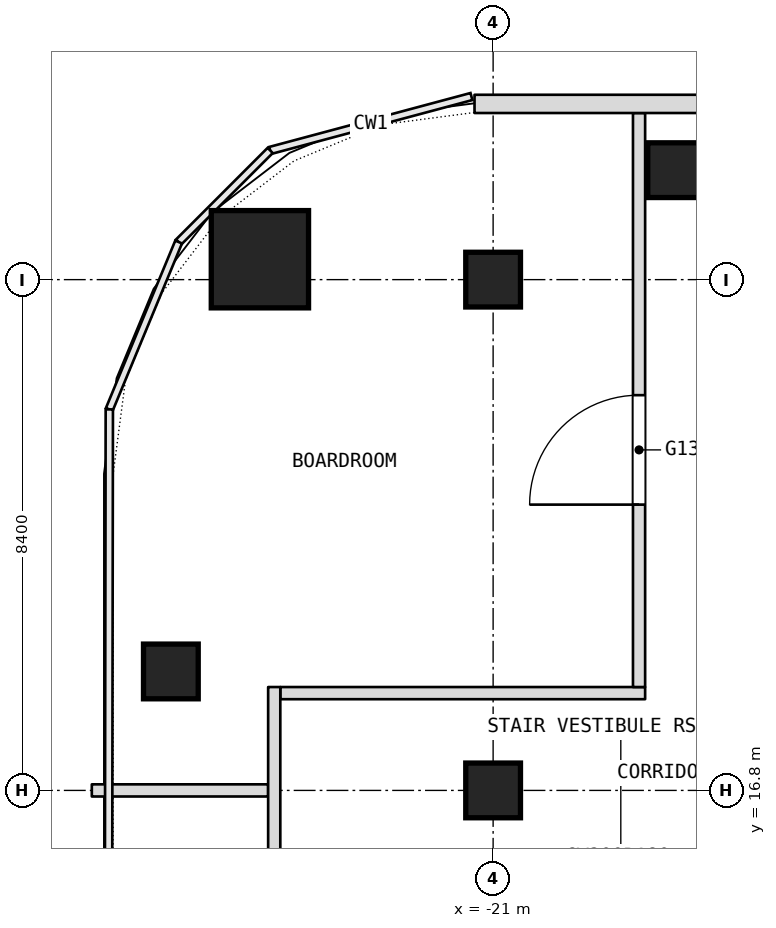
"""IFC4 building model, lengths in metres.
Left out: names, types, materials, properties, quantities, classifications, styles, units other than length and angle.
Written with IfcOpenShell. Run it as: python <this file> out.ifc"""

import sys

from ifc_helpers import new_model, si_unit, direction, frame, frame_2d, origin, origin_2d, place, context, subcontext, project, spatial, rectangle, extrude, element, fill, save


model = new_model("IFC4")
c1 = context("Model", 3, precision=1e-05, world=origin(), true_north=direction((0.0, 1.0)))
c2 = subcontext(c1, "Body", "Model", "MODEL_VIEW")
j1 = project(units=[si_unit("LENGTHUNIT", "METRE"), si_unit("PLANEANGLEUNIT", "RADIAN")], contexts=[c1])
p1 = place(None, origin())
s1 = spatial("IfcSite", under=j1, at=p1, CompositionType="ELEMENT")
p2 = place(p1, origin())
s2 = spatial("IfcBuilding", under=s1, at=p2, CompositionType="ELEMENT")
p3 = place(p2, frame((0.0, 0.0, 148.1)))
s3 = spatial("IfcBuildingStorey", under=s2, at=p3, CompositionType="ELEMENT", Elevation=148.1)
p4 = place(p3, frame((-24.835, 25.535, 0.0), z_axis=(0.0, 0.0, 1.0), x_axis=(1.0, 0.0, 0.0)))
e1 = element("IfcColumn", 1, at=p4, inside=s3, PredefinedType="COLUMN", context=c2, shape_type="SweptSolid", body=[
    extrude(rectangle(XDim=1.6, YDim=1.6, at=origin_2d()), origin(), (0.0, 0.0, 1.0), 3.6),
])
for number, where, z_axis, x_axis in (
    (2, (-21.0, 16.8, 0.0), (0.0, 0.0, 1.0), (1.0, 0.0, 0.0)),
    (3, (-21.0, 25.2, 0.0), (0.0, 0.0, 1.0), (1.0, 0.0, 0.0)),
    (4, (-26.3, 18.756, 0.0), (0.0, 0.0, 1.0), (1.0, 0.0, 0.0)),
    (5, (-18.007, 27.0, 0.0), (0.0, 0.0, 1.0), (1.0, 0.0, 0.0)),
):
    element("IfcColumn", number, at=place(p3, frame(where, z_axis=z_axis, x_axis=x_axis)), inside=s3, PredefinedType="COLUMN", context=c2, shape_type="SweptSolid", body=[
        extrude(rectangle(XDim=0.9, YDim=0.9, at=origin_2d()), origin(), (0.0, 0.0, 1.0), 3.6),
    ])
p5 = place(p3, frame((-27.6, 16.8, 0.0), z_axis=(0.0, 0.0, 1.0), x_axis=(1.0, 0.0, 0.0)))
e6 = element("IfcWall", 6, at=p5, inside=s3, PredefinedType="PARTITIONING", context=c2, shape_type="SweptSolid", body=[
    extrude(rectangle(XDim=2.9, YDim=0.2, at=frame_2d((1.45, 0.0))), origin(), (0.0, 0.0, 1.0), 2.89),
])
p6 = place(p3, frame((-24.5, 18.4, 0.0), z_axis=(0.0, 0.0, 1.0), x_axis=(1.0, 0.0, 0.0)))
e7 = element("IfcWall", 7, at=p6, inside=s3, PredefinedType="PARTITIONING", context=c2, shape_type="SweptSolid", body=[
    extrude(rectangle(XDim=6.0, YDim=0.2, at=frame_2d((3.0, 0.0))), origin(), (0.0, 0.0, 1.0), 3.34),
])
p7 = place(p3, frame((-18.6, 18.5, 0.0), z_axis=(0.0, 0.0, 1.0), x_axis=(0.0, 1.0, 0.0)))
e8 = element("IfcWall", 8, at=p7, inside=s3, PredefinedType="PARTITIONING", context=c2, shape_type="SweptSolid", body=[
    extrude(rectangle(XDim=9.44, YDim=0.2, at=frame_2d((4.72, 0.0))), origin(), (0.0, 0.0, 1.0), 3.34),
])
p8 = place(p7, frame((3.0, 0.0, 0.0)))
e9 = element("IfcOpeningElement", 9, at=p8, cuts=e8, PredefinedType="OPENING", context=c2, shape_type="SweptSolid", body=[
    extrude(rectangle(XDim=1.8, YDim=2.1, at=frame_2d((0.9, 1.05))), frame((0.0, 0.1, 0.0), z_axis=(0.0, -1.0, 0.0), x_axis=(1.0, 0.0, 0.0)), (0.0, 0.0, 1.0), 0.2),
])
p9 = place(p3, frame((-24.6, 6.9, 0.0), z_axis=(0.0, 0.0, 1.0), x_axis=(0.0, 1.0, 0.0)))
e10 = element("IfcWall", 10, at=p9, inside=s3, PredefinedType="PARTITIONING", context=c2, shape_type="SweptSolid", body=[
    extrude(rectangle(XDim=11.6, YDim=0.2, at=frame_2d((5.8, 0.0))), origin(), (0.0, 0.0, 1.0), 3.34),
])
p10 = place(p9, frame((5.45, 0.0, 0.0)))
e11 = element("IfcOpeningElement", 11, at=p10, cuts=e10, PredefinedType="OPENING", context=c2, shape_type="SweptSolid", body=[
    extrude(rectangle(XDim=1.8, YDim=2.1, at=frame_2d((0.9, 1.05))), frame((0.0, 0.1, 0.0), z_axis=(0.0, -1.0, 0.0), x_axis=(1.0, 0.0, 0.0)), (0.0, 0.0, 1.0), 0.2),
])
p11 = place(p3, frame((21.306, 28.09, 0.0), z_axis=(0.0, 0.0, 1.0), x_axis=(-1.0, 0.0, 0.0)))
e12 = element("IfcWall", 12, at=p11, inside=s3, PredefinedType="NOTDEFINED", context=c2, shape_type="SweptSolid", body=[
    extrude(rectangle(XDim=42.612, YDim=0.3, at=frame_2d((21.306, 0.0))), origin(), (0.0, 0.0, 1.0), 3.6),
])
p12 = place(p11, frame((5.406, 0.0, 0.9)))
e13 = element("IfcOpeningElement", 13, at=p12, cuts=e12, PredefinedType="OPENING", context=c2, shape_type="SweptSolid", body=[
    extrude(rectangle(XDim=2.4, YDim=2.1, at=frame_2d((1.2, 1.05))), frame((0.0, 0.15, 0.0), z_axis=(0.0, -1.0, 0.0), x_axis=(1.0, 0.0, 0.0)), (0.0, 0.0, 1.0), 0.3),
])
p13 = place(p11, frame((9.606, 0.0, 0.9)))
e14 = element("IfcOpeningElement", 14, at=p13, cuts=e12, PredefinedType="OPENING", context=c2, shape_type="SweptSolid", body=[
    extrude(rectangle(XDim=2.4, YDim=2.1, at=frame_2d((1.2, 1.05))), frame((0.0, 0.15, 0.0), z_axis=(0.0, -1.0, 0.0), x_axis=(1.0, 0.0, 0.0)), (0.0, 0.0, 1.0), 0.3),
])
p14 = place(p11, frame((13.806, 0.0, 0.9)))
e15 = element("IfcOpeningElement", 15, at=p14, cuts=e12, PredefinedType="OPENING", context=c2, shape_type="SweptSolid", body=[
    extrude(rectangle(XDim=2.4, YDim=2.1, at=frame_2d((1.2, 1.05))), frame((0.0, 0.15, 0.0), z_axis=(0.0, -1.0, 0.0), x_axis=(1.0, 0.0, 0.0)), (0.0, 0.0, 1.0), 0.3),
])
p15 = place(p11, frame((18.006, 0.0, 0.9)))
e16 = element("IfcOpeningElement", 16, at=p15, cuts=e12, PredefinedType="OPENING", context=c2, shape_type="SweptSolid", body=[
    extrude(rectangle(XDim=2.4, YDim=2.1, at=frame_2d((1.2, 1.05))), frame((0.0, 0.15, 0.0), z_axis=(0.0, -1.0, 0.0), x_axis=(1.0, 0.0, 0.0)), (0.0, 0.0, 1.0), 0.3),
])
p16 = place(p11, frame((22.206, 0.0, 0.9)))
e17 = element("IfcOpeningElement", 17, at=p16, cuts=e12, PredefinedType="OPENING", context=c2, shape_type="SweptSolid", body=[
    extrude(rectangle(XDim=2.4, YDim=2.1, at=frame_2d((1.2, 1.05))), frame((0.0, 0.15, 0.0), z_axis=(0.0, -1.0, 0.0), x_axis=(1.0, 0.0, 0.0)), (0.0, 0.0, 1.0), 0.3),
])
p17 = place(p11, frame((26.406, 0.0, 0.9)))
e18 = element("IfcOpeningElement", 18, at=p17, cuts=e12, PredefinedType="OPENING", context=c2, shape_type="SweptSolid", body=[
    extrude(rectangle(XDim=2.4, YDim=2.1, at=frame_2d((1.2, 1.05))), frame((0.0, 0.15, 0.0), z_axis=(0.0, -1.0, 0.0), x_axis=(1.0, 0.0, 0.0)), (0.0, 0.0, 1.0), 0.3),
])
p18 = place(p11, frame((30.606, 0.0, 0.9)))
e19 = element("IfcOpeningElement", 19, at=p18, cuts=e12, PredefinedType="OPENING", context=c2, shape_type="SweptSolid", body=[
    extrude(rectangle(XDim=2.4, YDim=2.1, at=frame_2d((1.2, 1.05))), frame((0.0, 0.15, 0.0), z_axis=(0.0, -1.0, 0.0), x_axis=(1.0, 0.0, 0.0)), (0.0, 0.0, 1.0), 0.3),
])
p19 = place(p11, frame((34.806, 0.0, 0.9)))
e20 = element("IfcOpeningElement", 20, at=p19, cuts=e12, PredefinedType="OPENING", context=c2, shape_type="SweptSolid", body=[
    extrude(rectangle(XDim=2.4, YDim=2.1, at=frame_2d((1.2, 1.05))), frame((0.0, 0.15, 0.0), z_axis=(0.0, -1.0, 0.0), x_axis=(1.0, 0.0, 0.0)), (0.0, 0.0, 1.0), 0.3),
])
p20 = place(p8, origin())
e21 = element("IfcDoor", 21, at=p20, inside=s3, OperationType="DOUBLE_DOOR_SINGLE_SWING", PredefinedType="DOOR", context=c2, shape_type="SweptSolid", body=[
    extrude(rectangle(XDim=1.8, YDim=2.1, at=frame_2d((0.9, 1.05))), frame((0.0, 0.025, 0.0), z_axis=(0.0, -1.0, 0.0), x_axis=(1.0, 0.0, 0.0)), (0.0, 0.0, 1.0), 0.05),
])
fill(e9, e21)
save(model, sys.argv[1])
